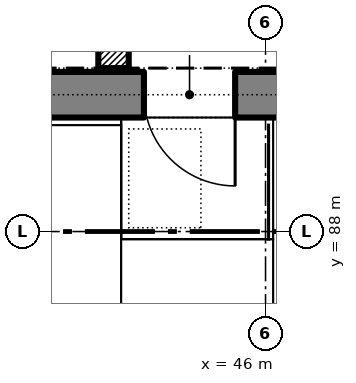
"""IFC4 building model, lengths in metres.
Left out: names, types, materials, properties, quantities, classifications, styles, units other than length and angle.
Written with IfcOpenShell. Run it as: python <this file> out.ifc"""

import sys

from ifc_helpers import new_model, si_unit, direction, frame, frame_2d, origin, origin_2d, place, context, subcontext, project, spatial, rectangle, extrude, element, fill, save


model = new_model("IFC4")
c1 = context("Model", 3, precision=1e-05, world=origin(), true_north=direction((0.0, 1.0)))
c2 = subcontext(c1, "Body", "Model", "MODEL_VIEW")
j1 = project(units=[si_unit("LENGTHUNIT", "METRE"), si_unit("PLANEANGLEUNIT", "RADIAN")], contexts=[c1])
p1 = place(None, origin())
s1 = spatial("IfcSite", under=j1, at=p1, CompositionType="ELEMENT")
p2 = place(p1, origin())
s2 = spatial("IfcBuilding", under=s1, at=p2, CompositionType="ELEMENT")
p3 = place(p2, frame((0.0, 0.0, 10.2)))
s3 = spatial("IfcBuildingStorey", under=s2, at=p3, CompositionType="ELEMENT", Elevation=10.2)
p4 = place(p3, frame((36.5, 89.8, 0.0), z_axis=(0.0, 0.0, 1.0), x_axis=(1.0, 0.0, 0.0)))
e1 = element("IfcWall", 1, at=p4, inside=s3, PredefinedType="SOLIDWALL", context=c2, shape_type="SweptSolid", body=[
    extrude(rectangle(XDim=52.6, YDim=0.6, at=frame_2d((26.3, 0.0))), origin(), (0.0, 0.0, 1.0), 4.8),
])
p5 = place(p4, frame((7.9, 0.0, 0.0)))
e2 = element("IfcOpeningElement", 2, at=p5, cuts=e1, PredefinedType="OPENING", context=c2, shape_type="SweptSolid", body=[
    extrude(rectangle(XDim=1.2, YDim=2.1, at=frame_2d((0.6, 1.05))), frame((0.0, 0.31, 0.0), z_axis=(0.0, -1.0, 0.0), x_axis=(1.0, 0.0, 0.0)), (0.0, 0.0, 1.0), 0.62),
])
p6 = place(p4, frame((15.4, 0.0, 0.0)))
e3 = element("IfcOpeningElement", 3, at=p6, cuts=e1, PredefinedType="OPENING", context=c2, shape_type="SweptSolid", body=[
    extrude(rectangle(XDim=1.2, YDim=2.1, at=frame_2d((0.6, 1.05))), frame((0.0, 0.31, 0.0), z_axis=(0.0, -1.0, 0.0), x_axis=(1.0, 0.0, 0.0)), (0.0, 0.0, 1.0), 0.62),
])
p7 = place(p4, frame((32.4, 0.0, 0.0)))
e4 = element("IfcOpeningElement", 4, at=p7, cuts=e1, PredefinedType="OPENING", context=c2, shape_type="SweptSolid", body=[
    extrude(rectangle(XDim=1.2, YDim=2.1, at=frame_2d((0.6, 1.05))), frame((0.0, 0.31, 0.0), z_axis=(0.0, -1.0, 0.0), x_axis=(1.0, 0.0, 0.0)), (0.0, 0.0, 1.0), 0.62),
])
p8 = place(p3, frame((44.0, 90.35, 0.0), z_axis=(0.0, 0.0, 1.0), x_axis=(1.0, 0.0, 0.0)))
e5 = element("IfcColumn", 5, at=p8, inside=s3, PredefinedType="COLUMN", context=c2, shape_type="SweptSolid", body=[
    extrude(rectangle(XDim=0.4, YDim=0.4, at=origin_2d()), origin(), (0.0, 0.0, 1.0), 4.8),
])
p9 = place(p5, frame((1.2, 0.0, 0.0), z_axis=(0.0, 0.0, 1.0), x_axis=(-1.0, 0.0, 0.0)))
e6 = element("IfcDoor", 6, at=p9, inside=s3, OperationType="SINGLE_SWING_LEFT", PredefinedType="DOOR", context=c2, shape_type="SweptSolid", body=[
    extrude(rectangle(XDim=1.2, YDim=2.1, at=frame_2d((0.6, 1.05))), frame((0.0, 0.025, 0.0), z_axis=(0.0, -1.0, 0.0), x_axis=(1.0, 0.0, 0.0)), (0.0, 0.0, 1.0), 0.05),
])
fill(e2, e6)
save(model, sys.argv[1])
